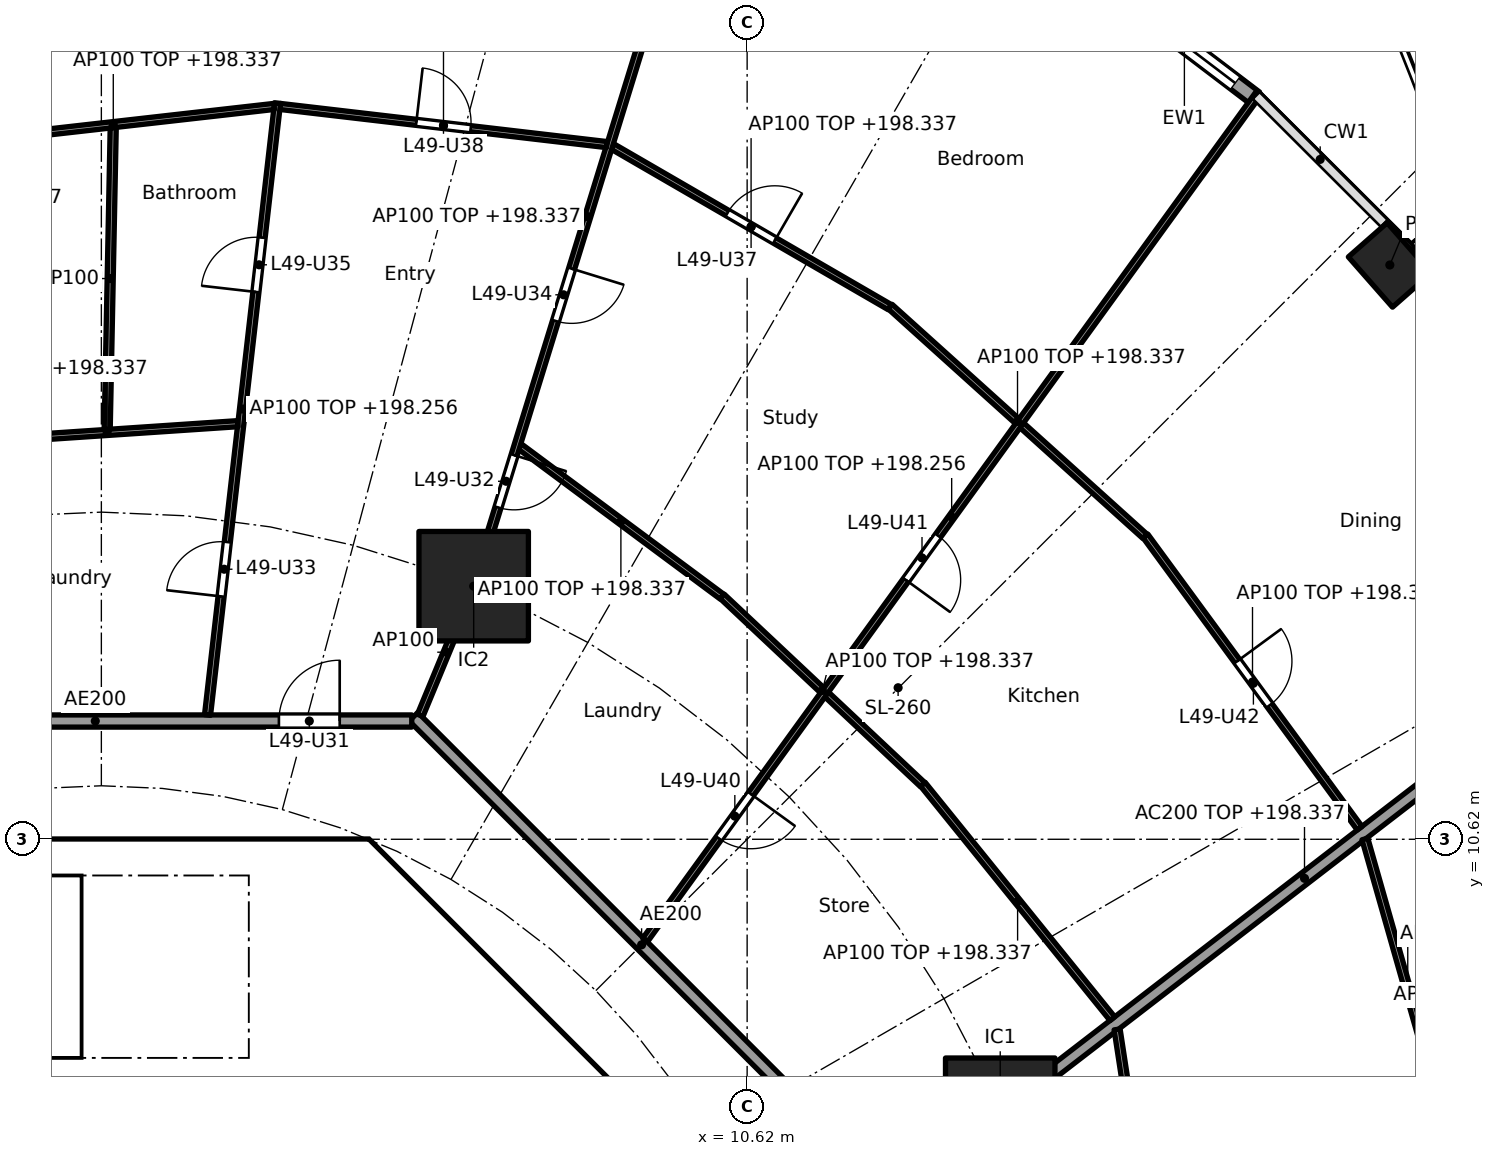
"""IFC4 building model, lengths in metres.
Left out: names, types, materials, properties, quantities, classifications, styles, units other than length and angle.
Written with IfcOpenShell. Run it as: python <this file> out.ifc"""

import sys

from ifc_helpers import new_model, si_unit, direction, frame, frame_2d, origin, origin_2d, place, context, subcontext, project, spatial, polyline, rectangle, hollow_rectangle, outline, extrude, element, fill, save


model = new_model("IFC4")
c1 = context("Model", 3, precision=1e-05, world=origin(), true_north=direction((0.0, 1.0)))
c2 = subcontext(c1, "Body", "Model", "MODEL_VIEW")
j1 = project(units=[si_unit("LENGTHUNIT", "METRE"), si_unit("PLANEANGLEUNIT", "RADIAN")], contexts=[c1])
p1 = place(None, origin())
s1 = spatial("IfcSite", under=j1, at=p1, CompositionType="ELEMENT")
p2 = place(p1, origin())
s2 = spatial("IfcBuilding", under=s1, at=p2, CompositionType="ELEMENT")
p3 = place(p2, frame((0.0, 0.0, 195.5)))
s3 = spatial("IfcBuildingStorey", under=s2, at=p3, CompositionType="ELEMENT", Elevation=195.5)
p4 = place(p3, frame((21.189, 20.064, 0.0), z_axis=(0.0, 0.0, 1.0), x_axis=(-0.660114607735, 0.751164898445, 0.0)))
e1 = element("IfcColumn", 1, at=p4, inside=s3, PredefinedType="COLUMN", context=c2, shape_type="SweptSolid", body=[
    extrude(hollow_rectangle(XDim=1.1, YDim=0.85, WallThickness=0.036, at=origin_2d()), origin(), (0.0, 0.0, 1.0), 3.7),
])
for number, where, z_axis, x_axis in (
    (2, (14.782, 6.123, 0.0), (0.0, 0.0, 1.0), (1.0, 0.0, 0.0)),
    (3, (6.123, 14.782, 0.0), (0.0, 0.0, 1.0), (1.0, 0.0, 0.0)),
):
    element("IfcColumn", number, at=place(p3, frame(where, z_axis=z_axis, x_axis=x_axis)), inside=s3, PredefinedType="COLUMN", context=c2, shape_type="SweptSolid", body=[
        extrude(rectangle(XDim=1.8, YDim=1.8, at=origin_2d()), origin(), (0.0, 0.0, 1.0), 3.7),
    ])
p5 = place(p3, frame((16.65, 24.574, 0.0), z_axis=(0.0, 0.0, 1.0), x_axis=(0.796055733703, -0.60522332146, 0.0)))
e4 = element("IfcWall", 4, at=p5, inside=s3, PredefinedType="SOLIDWALL", context=c2, shape_type="SweptSolid", body=[
    extrude(rectangle(XDim=2.917, YDim=0.25, at=frame_2d((1.458, 0.0))), origin(), (0.0, 0.0, 1.0), 3.44),
])
p6 = place(p5, frame((0.408, 0.0, 0.0)))
e5 = element("IfcOpeningElement", 5, at=p6, cuts=e4, PredefinedType="OPENING", context=c2, shape_type="SweptSolid", body=[
    extrude(rectangle(XDim=2.1, YDim=2.4, at=frame_2d((1.05, 1.2))), frame((0.0, 0.135, 0.0), z_axis=(0.0, -1.0, 0.0), x_axis=(1.0, 0.0, 0.0)), (0.0, 0.0, 1.0), 0.27),
])
p7 = place(p3, frame((9.988, 4.613, 0.0), z_axis=(0.0, 0.0, 1.0), x_axis=(-0.707106781187, 0.707106781187, 0.0)))
e6 = element("IfcWall", 6, at=p7, inside=s3, PredefinedType="SHEAR", context=c2, shape_type="SweptSolid", body=[
    extrude(rectangle(XDim=7.602, YDim=0.6, at=frame_2d((3.801, 0.0))), origin(), (0.0, 0.0, 1.0), 3.44),
])
p8 = place(p7, frame((3.201, 0.0, 0.0)))
e7 = element("IfcOpeningElement", 7, at=p8, cuts=e6, PredefinedType="OPENING", context=c2, shape_type="SweptSolid", body=[
    extrude(rectangle(XDim=1.2, YDim=2.1, at=frame_2d((0.6, 1.05))), frame((0.0, 0.31, 0.0), z_axis=(0.0, -1.0, 0.0), x_axis=(1.0, 0.0, 0.0)), (0.0, 0.0, 1.0), 0.62),
])
p9 = place(p3, frame((4.0, 7.025, 0.0), z_axis=(0.0, 0.0, 1.0), x_axis=(0.0, 1.0, 0.0)))
e8 = element("IfcWall", 8, at=p9, inside=s3, PredefinedType="SOLIDWALL", context=c2, shape_type="SweptSolid", body=[
    extrude(rectangle(XDim=3.0, YDim=0.2, at=frame_2d((1.5, 0.0))), origin(), (0.0, 0.0, 1.0), 3.44),
])
p10 = place(p9, frame((0.925, 0.0, 0.0)))
e9 = element("IfcOpeningElement", 9, at=p10, cuts=e8, PredefinedType="OPENING", context=c2, shape_type="SweptSolid", body=[
    extrude(rectangle(XDim=1.1, YDim=2.1, at=frame_2d((0.55, 1.05))), frame((0.0, 0.11, 0.0), z_axis=(0.0, -1.0, 0.0), x_axis=(1.0, 0.0, 0.0)), (0.0, 0.0, 1.0), 0.22),
])
p11 = place(p3, origin())
e10 = element("IfcWall", 10, at=p11, inside=s3, PredefinedType="SHEAR", context=c2, shape_type="SweptSolid", body=[
    extrude(outline(polyline([(-4.152, 10.025), (-4.401, 9.776), (-4.825, 10.2), (-4.401, 10.625), (4.401, 10.625), (4.825, 10.2), (4.401, 9.776), (4.152, 10.025), (-4.152, 10.025)])), origin(), (0.0, 0.0, 1.0), 3.44),
])
p12 = place(p3, origin())
e11 = element("IfcWall", 11, at=p12, inside=s3, PredefinedType="SOLIDWALL", context=c2, shape_type="SweptSolid", body=[
    extrude(outline(polyline([(4.1, 6.5), (-4.1, 6.5), (-4.1, 7.025), (4.1, 7.025), (4.1, 6.5)])), origin(), (0.0, 0.0, 1.0), 3.44),
])
p13 = place(p3, frame((14.822, 6.154, 0.0), z_axis=(0.0, 0.0, 1.0), x_axis=(0.792203056092, 0.610257583254, 0.0)))
e12 = element("IfcWall", 12, at=p13, inside=s3, PredefinedType="PARTITIONING", context=c2, shape_type="SweptSolid", body=[
    extrude(rectangle(XDim=12.533, YDim=0.2, at=frame_2d((6.266, 0.0))), origin(), (0.0, 0.0, 1.0), 2.837),
])
p14 = place(p3, frame((12.635, 5.134, 0.0), z_axis=(0.0, 0.0, 1.0), x_axis=(-0.707106781187, 0.707106781187, 0.0)))
e13 = element("IfcWall", 13, at=p14, inside=s3, PredefinedType="PARTITIONING", context=c2, shape_type="SweptSolid", body=[
    extrude(rectangle(XDim=10.609, YDim=0.2, at=frame_2d((5.305, 0.0))), origin(), (0.0, 0.0, 1.0), 3.44),
])
p15 = place(p3, frame((5.104, 12.565, 0.0), z_axis=(0.0, 0.0, 1.0), x_axis=(-1.0, 0.0, 0.0)))
e14 = element("IfcWall", 14, at=p15, inside=s3, PredefinedType="PARTITIONING", context=c2, shape_type="SweptSolid", body=[
    extrude(rectangle(XDim=10.409, YDim=0.2, at=frame_2d((5.205, 0.0))), origin(), (0.0, 0.0, 1.0), 3.44),
])
p16 = place(p15, frame((1.185, 0.0, 0.0)))
e15 = element("IfcOpeningElement", 15, at=p16, cuts=e14, PredefinedType="OPENING", context=c2, shape_type="SweptSolid", body=[
    extrude(rectangle(XDim=1.0, YDim=2.1, at=frame_2d((0.5, 1.05))), frame((0.0, 0.11, 0.0), z_axis=(0.0, -1.0, 0.0), x_axis=(1.0, 0.0, 0.0)), (0.0, 0.0, 1.0), 0.22),
])
p17 = place(p3, frame((17.236, 4.014, 0.0), z_axis=(0.0, 0.0, 1.0), x_axis=(-0.151087537093, 0.988520387314, 0.0)))
e16 = element("IfcWall", 16, at=p17, inside=s3, PredefinedType="PARTITIONING", context=c2, shape_type="SweptSolid", body=[
    extrude(rectangle(XDim=3.519, YDim=0.1, at=frame_2d((1.76, 0.0))), origin(), (0.0, 0.0, 1.0), 2.837),
])
p18 = place(p3, frame((22.189, 5.67, 0.0), z_axis=(0.0, 0.0, 1.0), x_axis=(-0.273819702124, 0.961781040949, 0.0)))
e17 = element("IfcWall", 17, at=p18, inside=s3, PredefinedType="PARTITIONING", context=c2, shape_type="SweptSolid", body=[
    extrude(rectangle(XDim=5.152, YDim=0.1, at=frame_2d((2.576, 0.0))), origin(), (0.0, 0.0, 1.0), 2.837),
])
p19 = place(p3, frame((16.626, 7.67, 0.0), z_axis=(0.0, 0.0, 1.0), x_axis=(-0.628764602857, 0.777595700987, 0.0)))
e18 = element("IfcWall", 18, at=p19, inside=s3, PredefinedType="PARTITIONING", context=c2, shape_type="SweptSolid", body=[
    extrude(rectangle(XDim=4.957, YDim=0.1, at=frame_2d((2.479, 0.0))), origin(), (0.0, 0.0, 1.0), 2.837),
])
p20 = place(p3, frame((20.692, 10.802, 0.0), z_axis=(0.0, 0.0, 1.0), x_axis=(-0.591122127251, 0.806582066918, 0.0)))
e19 = element("IfcWall", 19, at=p20, inside=s3, PredefinedType="PARTITIONING", context=c2, shape_type="SweptSolid", body=[
    extrude(rectangle(XDim=5.96, YDim=0.1, at=frame_2d((2.98, 0.0))), origin(), (0.0, 0.0, 1.0), 2.837),
])
p21 = place(p20, frame((2.505, 0.0, 0.0)))
e20 = element("IfcOpeningElement", 20, at=p21, cuts=e19, PredefinedType="OPENING", context=c2, shape_type="SweptSolid", body=[
    extrude(rectangle(XDim=0.9, YDim=2.1, at=frame_2d((0.45, 1.05))), frame((0.0, 0.06, 0.0), z_axis=(0.0, -1.0, 0.0), x_axis=(1.0, 0.0, 0.0)), (0.0, 0.0, 1.0), 0.12),
])
p22 = place(p3, frame((13.504, 11.52, 0.0), z_axis=(0.0, 0.0, 1.0), x_axis=(-0.728883199496, 0.684638066055, 0.0)))
e21 = element("IfcWall", 21, at=p22, inside=s3, PredefinedType="PARTITIONING", context=c2, shape_type="SweptSolid", body=[
    extrude(rectangle(XDim=4.519, YDim=0.1, at=frame_2d((2.26, 0.0))), origin(), (0.0, 0.0, 1.0), 2.837),
])
p23 = place(p3, frame((17.162, 15.603, 0.0), z_axis=(0.0, 0.0, 1.0), x_axis=(-0.742768881471, 0.669547898748, 0.0)))
e22 = element("IfcWall", 22, at=p23, inside=s3, PredefinedType="PARTITIONING", context=c2, shape_type="SweptSolid", body=[
    extrude(rectangle(XDim=5.642, YDim=0.1, at=frame_2d((2.821, 0.0))), origin(), (0.0, 0.0, 1.0), 2.837),
])
p24 = place(p3, frame((8.943, 8.966, 0.0), z_axis=(0.0, 0.0, 1.0), x_axis=(0.586803608919, 0.809729290912, 0.0)))
e23 = element("IfcWall", 23, at=p24, inside=s3, PredefinedType="PARTITIONING", context=c2, shape_type="SweptSolid", body=[
    extrude(rectangle(XDim=17.179, YDim=0.1, at=frame_2d((8.589, 0.0))), origin(), (0.0, 0.0, 1.0), 2.756),
])
p25 = place(p24, frame((2.062, 0.0, 0.0)))
e24 = element("IfcOpeningElement", 24, at=p25, cuts=e23, PredefinedType="OPENING", context=c2, shape_type="SweptSolid", body=[
    extrude(rectangle(XDim=0.9, YDim=2.1, at=frame_2d((0.45, 1.05))), frame((0.0, 0.06, 0.0), z_axis=(0.0, -1.0, 0.0), x_axis=(1.0, 0.0, 0.0)), (0.0, 0.0, 1.0), 0.12),
])
p26 = place(p24, frame((7.308, 0.0, 0.0)))
e25 = element("IfcOpeningElement", 25, at=p26, cuts=e23, PredefinedType="OPENING", context=c2, shape_type="SweptSolid", body=[
    extrude(rectangle(XDim=0.9, YDim=2.1, at=frame_2d((0.45, 1.05))), frame((0.0, 0.06, 0.0), z_axis=(0.0, -1.0, 0.0), x_axis=(1.0, 0.0, 0.0)), (0.0, 0.0, 1.0), 0.12),
])
p27 = place(p3, frame((10.207, 14.61, 0.0), z_axis=(0.0, 0.0, 1.0), x_axis=(-0.802784956441, 0.596268659005, 0.0)))
e26 = element("IfcWall", 26, at=p27, inside=s3, PredefinedType="PARTITIONING", context=c2, shape_type="SweptSolid", body=[
    extrude(rectangle(XDim=4.142, YDim=0.1, at=frame_2d((2.071, 0.0))), origin(), (0.0, 0.0, 1.0), 2.837),
])
p28 = place(p3, frame((12.965, 19.371, 0.0), z_axis=(0.0, 0.0, 1.0), x_axis=(-0.865277177388, 0.501293732547, 0.0)))
e27 = element("IfcWall", 27, at=p28, inside=s3, PredefinedType="PARTITIONING", context=c2, shape_type="SweptSolid", body=[
    extrude(rectangle(XDim=5.27, YDim=0.1, at=frame_2d((2.635, 0.0))), origin(), (0.0, 0.0, 1.0), 2.837),
])
p29 = place(p28, frame((2.185, 0.0, 0.0)))
e28 = element("IfcOpeningElement", 28, at=p29, cuts=e27, PredefinedType="OPENING", context=c2, shape_type="SweptSolid", body=[
    extrude(rectangle(XDim=0.9, YDim=2.1, at=frame_2d((0.45, 1.05))), frame((0.0, 0.06, 0.0), z_axis=(0.0, -1.0, 0.0), x_axis=(1.0, 0.0, 0.0)), (0.0, 0.0, 1.0), 0.12),
])
p30 = place(p3, frame((5.243, 12.657, 0.0), z_axis=(0.0, 0.0, 1.0), x_axis=(0.382719158442, 0.923864733477, 0.0)))
e29 = element("IfcWall", 29, at=p30, inside=s3, PredefinedType="PARTITIONING", context=c2, shape_type="SweptSolid", body=[
    extrude(rectangle(XDim=2.25, YDim=0.1, at=frame_2d((1.125, 0.0))), origin(), (0.0, 0.0, 1.0), 3.44),
])
p31 = place(p3, frame((6.138, 14.83, 0.0), z_axis=(0.0, 0.0, 1.0), x_axis=(0.294818517221, 0.955553264818, 0.0)))
e30 = element("IfcWall", 30, at=p31, inside=s3, PredefinedType="PARTITIONING", context=c2, shape_type="SweptSolid", body=[
    extrude(rectangle(XDim=12.619, YDim=0.1, at=frame_2d((6.31, 0.0))), origin(), (0.0, 0.0, 1.0), 2.837),
])
p32 = place(p31, frame((1.306, 0.0, 0.0)))
e31 = element("IfcOpeningElement", 31, at=p32, cuts=e30, PredefinedType="OPENING", context=c2, shape_type="SweptSolid", body=[
    extrude(rectangle(XDim=0.9, YDim=2.1, at=frame_2d((0.45, 1.05))), frame((0.0, 0.06, 0.0), z_axis=(0.0, -1.0, 0.0), x_axis=(1.0, 0.0, 0.0)), (0.0, 0.0, 1.0), 0.12),
])
p33 = place(p31, frame((4.515, 0.0, 0.0)))
e32 = element("IfcOpeningElement", 32, at=p33, cuts=e30, PredefinedType="OPENING", context=c2, shape_type="SweptSolid", body=[
    extrude(rectangle(XDim=0.9, YDim=2.1, at=frame_2d((0.45, 1.05))), frame((0.0, 0.06, 0.0), z_axis=(0.0, -1.0, 0.0), x_axis=(1.0, 0.0, 0.0)), (0.0, 0.0, 1.0), 0.12),
])
p34 = place(p3, frame((8.312, 22.044, 0.0), z_axis=(0.0, 0.0, 1.0), x_axis=(-0.993245806382, 0.1160291692, 0.0)))
e33 = element("IfcWall", 33, at=p34, inside=s3, PredefinedType="PARTITIONING", context=c2, shape_type="SweptSolid", body=[
    extrude(rectangle(XDim=5.408, YDim=0.1, at=frame_2d((2.704, 0.0))), origin(), (0.0, 0.0, 1.0), 2.837),
])
p35 = place(p34, frame((2.254, 0.0, 0.0)))
e34 = element("IfcOpeningElement", 34, at=p35, cuts=e33, PredefinedType="OPENING", context=c2, shape_type="SweptSolid", body=[
    extrude(rectangle(XDim=0.9, YDim=2.1, at=frame_2d((0.45, 1.05))), frame((0.0, 0.06, 0.0), z_axis=(0.0, -1.0, 0.0), x_axis=(1.0, 0.0, 0.0)), (0.0, 0.0, 1.0), 0.12),
])
p36 = place(p3, frame((1.746, 12.664, 0.0), z_axis=(0.0, 0.0, 1.0), x_axis=(0.113629529561, 0.993523190475, 0.0)))
e35 = element("IfcWall", 35, at=p36, inside=s3, PredefinedType="PARTITIONING", context=c2, shape_type="SweptSolid", body=[
    extrude(rectangle(XDim=10.128, YDim=0.1, at=frame_2d((5.064, 0.0))), origin(), (0.0, 0.0, 1.0), 2.756),
])
p37 = place(p36, frame((1.962, 0.0, 0.0)))
e36 = element("IfcOpeningElement", 36, at=p37, cuts=e35, PredefinedType="OPENING", context=c2, shape_type="SweptSolid", body=[
    extrude(rectangle(XDim=0.9, YDim=2.1, at=frame_2d((0.45, 1.05))), frame((0.0, 0.06, 0.0), z_axis=(0.0, -1.0, 0.0), x_axis=(1.0, 0.0, 0.0)), (0.0, 0.0, 1.0), 0.12),
])
p38 = place(p36, frame((7.002, 0.0, 0.0)))
e37 = element("IfcOpeningElement", 37, at=p38, cuts=e35, PredefinedType="OPENING", context=c2, shape_type="SweptSolid", body=[
    extrude(rectangle(XDim=0.9, YDim=2.1, at=frame_2d((0.45, 1.05))), frame((0.0, 0.06, 0.0), z_axis=(0.0, -1.0, 0.0), x_axis=(1.0, 0.0, 0.0)), (0.0, 0.0, 1.0), 0.12),
])
p39 = place(p3, frame((2.244, 17.455, 0.0), z_axis=(0.0, 0.0, 1.0), x_axis=(-0.997754717554, -0.066974051687, 0.0)))
e38 = element("IfcWall", 38, at=p39, inside=s3, PredefinedType="PARTITIONING", context=c2, shape_type="SweptSolid", body=[
    extrude(rectangle(XDim=4.309, YDim=0.1, at=frame_2d((2.154, 0.0))), origin(), (0.0, 0.0, 1.0), 2.837),
])
p40 = place(p3, frame((2.842, 22.671, 0.0), z_axis=(0.0, 0.0, 1.0), x_axis=(-0.993660315081, -0.112424099879, 0.0)))
e39 = element("IfcWall", 39, at=p40, inside=s3, PredefinedType="PARTITIONING", context=c2, shape_type="SweptSolid", body=[
    extrude(rectangle(XDim=5.325, YDim=0.1, at=frame_2d((2.662, 0.0))), origin(), (0.0, 0.0, 1.0), 2.837),
])
p41 = place(p3, frame((0.096, 17.36, 0.0), z_axis=(0.0, 0.0, 1.0), x_axis=(0.019973380305, 0.999800512142, 0.0)))
e40 = element("IfcWall", 40, at=p41, inside=s3, PredefinedType="PARTITIONING", context=c2, shape_type="SweptSolid", body=[
    extrude(rectangle(XDim=4.963, YDim=0.1, at=frame_2d((2.481, 0.0))), origin(), (0.0, 0.0, 1.0), 3.44),
])
p42 = place(p6, origin())
e41 = element("IfcDoor", 41, at=p42, inside=s3, OperationType="SLIDING_TO_LEFT", PredefinedType="DOOR", context=c2, shape_type="SweptSolid", body=[
    extrude(rectangle(XDim=2.1, YDim=2.4, at=frame_2d((1.05, 1.2))), frame((0.0, 0.025, 0.0), z_axis=(0.0, -1.0, 0.0), x_axis=(1.0, 0.0, 0.0)), (0.0, 0.0, 1.0), 0.05),
])
fill(e5, e41)
p43 = place(p10, origin())
e42 = element("IfcDoor", 42, at=p43, inside=s3, OperationType="SINGLE_SWING_RIGHT", PredefinedType="DOOR", context=c2, shape_type="SweptSolid", body=[
    extrude(rectangle(XDim=1.1, YDim=2.1, at=frame_2d((0.55, 1.05))), frame((0.0, 0.025, 0.0), z_axis=(0.0, -1.0, 0.0), x_axis=(1.0, 0.0, 0.0)), (0.0, 0.0, 1.0), 0.05),
])
fill(e9, e42)
p44 = place(p8, origin())
e43 = element("IfcDoor", 43, at=p44, inside=s3, OperationType="SINGLE_SWING_RIGHT", PredefinedType="DOOR", context=c2, shape_type="SweptSolid", body=[
    extrude(rectangle(XDim=1.2, YDim=2.1, at=frame_2d((0.6, 1.05))), frame((0.0, 0.025, 0.0), z_axis=(0.0, -1.0, 0.0), x_axis=(1.0, 0.0, 0.0)), (0.0, 0.0, 1.0), 0.05),
])
fill(e7, e43)
p45 = place(p16, frame((1.0, 0.0, 0.0), x_axis=(-1.0, 0.0, 0.0)))
e44 = element("IfcDoor", 44, at=p45, inside=s3, OperationType="SINGLE_SWING_RIGHT", PredefinedType="DOOR", context=c2, shape_type="SweptSolid", body=[
    extrude(rectangle(XDim=1.0, YDim=2.1, at=frame_2d((0.5, 1.05))), frame((0.0, 0.025, 0.0), z_axis=(0.0, -1.0, 0.0), x_axis=(1.0, 0.0, 0.0)), (0.0, 0.0, 1.0), 0.05),
])
fill(e15, e44)
p46 = place(p32, frame((0.9, 0.0, 0.0), x_axis=(-1.0, 0.0, 0.0)))
e45 = element("IfcDoor", 45, at=p46, inside=s3, OperationType="SINGLE_SWING_LEFT", PredefinedType="DOOR", context=c2, shape_type="SweptSolid", body=[
    extrude(rectangle(XDim=0.9, YDim=2.1, at=frame_2d((0.45, 1.05))), frame((0.0, 0.025, 0.0), z_axis=(0.0, -1.0, 0.0), x_axis=(1.0, 0.0, 0.0)), (0.0, 0.0, 1.0), 0.05),
])
fill(e31, e45)
p47 = place(p37, origin())
e46 = element("IfcDoor", 46, at=p47, inside=s3, OperationType="SINGLE_SWING_LEFT", PredefinedType="DOOR", context=c2, shape_type="SweptSolid", body=[
    extrude(rectangle(XDim=0.9, YDim=2.1, at=frame_2d((0.45, 1.05))), frame((0.0, 0.025, 0.0), z_axis=(0.0, -1.0, 0.0), x_axis=(1.0, 0.0, 0.0)), (0.0, 0.0, 1.0), 0.05),
])
fill(e36, e46)
p48 = place(p33, frame((0.9, 0.0, 0.0), x_axis=(-1.0, 0.0, 0.0)))
e47 = element("IfcDoor", 47, at=p48, inside=s3, OperationType="SINGLE_SWING_LEFT", PredefinedType="DOOR", context=c2, shape_type="SweptSolid", body=[
    extrude(rectangle(XDim=0.9, YDim=2.1, at=frame_2d((0.45, 1.05))), frame((0.0, 0.025, 0.0), z_axis=(0.0, -1.0, 0.0), x_axis=(1.0, 0.0, 0.0)), (0.0, 0.0, 1.0), 0.05),
])
fill(e32, e47)
p49 = place(p38, origin())
e48 = element("IfcDoor", 48, at=p49, inside=s3, OperationType="SINGLE_SWING_LEFT", PredefinedType="DOOR", context=c2, shape_type="SweptSolid", body=[
    extrude(rectangle(XDim=0.9, YDim=2.1, at=frame_2d((0.45, 1.05))), frame((0.0, 0.025, 0.0), z_axis=(0.0, -1.0, 0.0), x_axis=(1.0, 0.0, 0.0)), (0.0, 0.0, 1.0), 0.05),
])
fill(e37, e48)
p50 = place(p29, frame((0.9, 0.0, 0.0), x_axis=(-1.0, 0.0, 0.0)))
e49 = element("IfcDoor", 49, at=p50, inside=s3, OperationType="SINGLE_SWING_RIGHT", PredefinedType="DOOR", context=c2, shape_type="SweptSolid", body=[
    extrude(rectangle(XDim=0.9, YDim=2.1, at=frame_2d((0.45, 1.05))), frame((0.0, 0.025, 0.0), z_axis=(0.0, -1.0, 0.0), x_axis=(1.0, 0.0, 0.0)), (0.0, 0.0, 1.0), 0.05),
])
fill(e28, e49)
p51 = place(p35, frame((0.9, 0.0, 0.0), x_axis=(-1.0, 0.0, 0.0)))
e50 = element("IfcDoor", 50, at=p51, inside=s3, OperationType="SINGLE_SWING_LEFT", PredefinedType="DOOR", context=c2, shape_type="SweptSolid", body=[
    extrude(rectangle(XDim=0.9, YDim=2.1, at=frame_2d((0.45, 1.05))), frame((0.0, 0.025, 0.0), z_axis=(0.0, -1.0, 0.0), x_axis=(1.0, 0.0, 0.0)), (0.0, 0.0, 1.0), 0.05),
])
fill(e34, e50)
p52 = place(p25, frame((0.9, 0.0, 0.0), x_axis=(-1.0, 0.0, 0.0)))
e51 = element("IfcDoor", 51, at=p52, inside=s3, OperationType="SINGLE_SWING_LEFT", PredefinedType="DOOR", context=c2, shape_type="SweptSolid", body=[
    extrude(rectangle(XDim=0.9, YDim=2.1, at=frame_2d((0.45, 1.05))), frame((0.0, 0.025, 0.0), z_axis=(0.0, -1.0, 0.0), x_axis=(1.0, 0.0, 0.0)), (0.0, 0.0, 1.0), 0.05),
])
fill(e24, e51)
p53 = place(p26, frame((0.9, 0.0, 0.0), x_axis=(-1.0, 0.0, 0.0)))
e52 = element("IfcDoor", 52, at=p53, inside=s3, OperationType="SINGLE_SWING_RIGHT", PredefinedType="DOOR", context=c2, shape_type="SweptSolid", body=[
    extrude(rectangle(XDim=0.9, YDim=2.1, at=frame_2d((0.45, 1.05))), frame((0.0, 0.025, 0.0), z_axis=(0.0, -1.0, 0.0), x_axis=(1.0, 0.0, 0.0)), (0.0, 0.0, 1.0), 0.05),
])
fill(e25, e52)
p54 = place(p21, frame((0.9, 0.0, 0.0), x_axis=(-1.0, 0.0, 0.0)))
e53 = element("IfcDoor", 53, at=p54, inside=s3, OperationType="SINGLE_SWING_LEFT", PredefinedType="DOOR", context=c2, shape_type="SweptSolid", body=[
    extrude(rectangle(XDim=0.9, YDim=2.1, at=frame_2d((0.45, 1.05))), frame((0.0, 0.025, 0.0), z_axis=(0.0, -1.0, 0.0), x_axis=(1.0, 0.0, 0.0)), (0.0, 0.0, 1.0), 0.05),
])
fill(e20, e53)
save(model, sys.argv[1])
